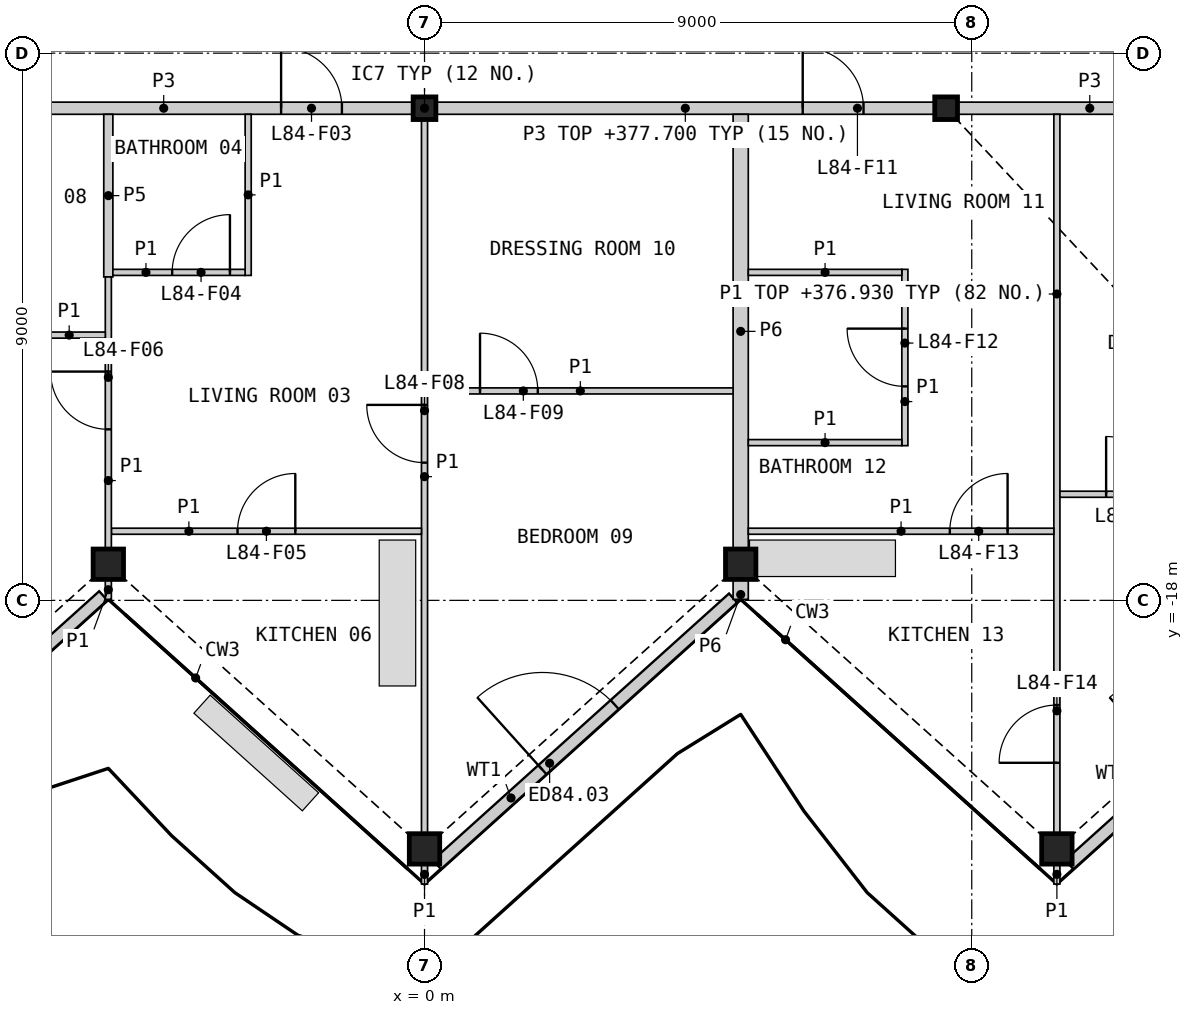
"""IFC4 building model, lengths in metres.
Left out: names, types, materials, properties, quantities, classifications, styles, units other than length and angle.
Written with IfcOpenShell. Run it as: python <this file> out.ifc"""

import sys

from ifc_helpers import new_model, si_unit, direction, frame, frame_2d, origin, origin_2d, place, context, subcontext, project, spatial, rectangle, hollow_rectangle, i_section, extrude, element, fill, save


model = new_model("IFC4")
c1 = context("Model", 3, precision=1e-05, world=origin(), true_north=direction((0.0, 1.0)))
c2 = subcontext(c1, "Body", "Model", "MODEL_VIEW")
j1 = project(units=[si_unit("LENGTHUNIT", "METRE"), si_unit("PLANEANGLEUNIT", "RADIAN")], contexts=[c1])
p1 = place(None, origin())
s1 = spatial("IfcSite", under=j1, at=p1, CompositionType="ELEMENT")
p2 = place(p1, origin())
s2 = spatial("IfcBuilding", under=s1, at=p2, CompositionType="ELEMENT")
p3 = place(p2, frame((0.0, 0.0, 374.6)))
s3 = spatial("IfcBuildingStorey", under=s2, at=p3, CompositionType="ELEMENT", Elevation=374.6)
for number, where, z_axis, x_axis in (
    (1, (-5.2, -17.406, 0.0), (0.0, 0.0, 1.0), (1.0, 0.0, 0.0)),
    (2, (0.0, -22.088, 0.0), (0.0, 0.0, 1.0), (1.0, 0.0, 0.0)),
    (3, (5.2, -17.406, 0.0), (0.0, 0.0, 1.0), (1.0, 0.0, 0.0)),
    (4, (10.4, -22.088, 0.0), (0.0, 0.0, 1.0), (1.0, 0.0, 0.0)),
):
    element("IfcColumn", number, at=place(p3, frame(where, z_axis=z_axis, x_axis=x_axis)), inside=s3, PredefinedType="COLUMN", context=c2, shape_type="SweptSolid", body=[
        extrude(hollow_rectangle(XDim=0.5, YDim=0.5, WallThickness=0.03, at=origin_2d()), origin(), (0.0, 0.0, 1.0), 3.4),
    ])
for number, where, z_axis, x_axis in (
    (5, (0.0, -9.906, 0.0), (0.0, 0.0, 1.0), (1.0, 0.0, 0.0)),
    (6, (8.578, -9.906, 0.0), (0.0, 0.0, 1.0), (1.0, 0.0, 0.0)),
):
    element("IfcColumn", number, at=place(p3, frame(where, z_axis=z_axis, x_axis=x_axis)), inside=s3, PredefinedType="COLUMN", context=c2, shape_type="SweptSolid", body=[
        extrude(i_section(OverallWidth=0.374, OverallDepth=0.372, WebThickness=0.016, FlangeThickness=0.026, at=origin_2d()), origin(), (0.0, 0.0, 1.0), 3.4),
    ])
p4 = place(p3, frame((-10.195, -22.346, 0.0), z_axis=(0.0, 0.0, 1.0), x_axis=(0.74313432117, 0.66914227239, 0.0)))
e7 = element("IfcWall", 7, at=p4, inside=s3, PredefinedType="SOLIDWALL", context=c2, shape_type="SweptSolid", body=[
    extrude(rectangle(XDim=6.609, YDim=0.2, at=frame_2d((3.304, 0.0))), origin(), (0.0, 0.0, 1.0), 2.634),
])
p5 = place(p4, frame((2.333, 0.0, 0.0)))
e8 = element("IfcOpeningElement", 8, at=p5, cuts=e7, PredefinedType="OPENING", context=c2, shape_type="SweptSolid", body=[
    extrude(rectangle(XDim=1.6, YDim=2.25, at=frame_2d((0.8, 1.125))), frame((0.0, 0.11, 0.0), z_axis=(0.0, -1.0, 0.0), x_axis=(1.0, 0.0, 0.0)), (0.0, 0.0, 1.0), 0.22),
])
p6 = place(p3, frame((0.205, -22.346, 0.0), z_axis=(0.0, 0.0, 1.0), x_axis=(0.74313295916, 0.669143785004, 0.0)))
e9 = element("IfcWall", 9, at=p6, inside=s3, PredefinedType="SOLIDWALL", context=c2, shape_type="SweptSolid", body=[
    extrude(rectangle(XDim=6.553, YDim=0.2, at=frame_2d((3.277, 0.0))), origin(), (0.0, 0.0, 1.0), 2.634),
])
p7 = place(p6, frame((2.333, 0.0, 0.0)))
e10 = element("IfcOpeningElement", 10, at=p7, cuts=e9, PredefinedType="OPENING", context=c2, shape_type="SweptSolid", body=[
    extrude(rectangle(XDim=1.6, YDim=2.25, at=frame_2d((0.8, 1.125))), frame((0.0, 0.11, 0.0), z_axis=(0.0, -1.0, 0.0), x_axis=(1.0, 0.0, 0.0)), (0.0, 0.0, 1.0), 0.22),
])
p8 = place(p3, frame((10.605, -22.346, 0.0), z_axis=(0.0, 0.0, 1.0), x_axis=(0.743137181878, 0.669139095339, 0.0)))
e11 = element("IfcWall", 11, at=p8, inside=s3, PredefinedType="SOLIDWALL", context=c2, shape_type="SweptSolid", body=[
    extrude(rectangle(XDim=6.265, YDim=0.2, at=frame_2d((3.133, 0.0))), origin(), (0.0, 0.0, 1.0), 2.634),
])
p9 = place(p8, frame((2.333, 0.0, 0.0)))
e12 = element("IfcOpeningElement", 12, at=p9, cuts=e11, PredefinedType="OPENING", context=c2, shape_type="SweptSolid", body=[
    extrude(rectangle(XDim=1.6, YDim=2.25, at=frame_2d((0.8, 1.125))), frame((0.0, 0.11, 0.0), z_axis=(0.0, -1.0, 0.0), x_axis=(1.0, 0.0, 0.0)), (0.0, 0.0, 1.0), 0.22),
])
p10 = place(p3, frame((0.197, -9.906, 0.0), z_axis=(0.0, 0.0, 1.0), x_axis=(1.0, 0.0, 0.0)))
e13 = element("IfcWall", 13, at=p10, inside=s3, PredefinedType="PARTITIONING", context=c2, shape_type="SweptSolid", body=[
    extrude(rectangle(XDim=8.185, YDim=0.2, at=frame_2d((4.092, 0.0))), origin(), (0.0, 0.0, 1.0), 3.1),
])
p11 = place(p10, frame((6.023, 0.0, 0.0)))
e14 = element("IfcOpeningElement", 14, at=p11, cuts=e13, PredefinedType="OPENING", context=c2, shape_type="SweptSolid", body=[
    extrude(rectangle(XDim=1.0, YDim=2.1, at=frame_2d((0.5, 1.05))), frame((0.0, 0.11, 0.0), z_axis=(0.0, -1.0, 0.0), x_axis=(1.0, 0.0, 0.0)), (0.0, 0.0, 1.0), 0.22),
])
p12 = place(p3, frame((-8.382, -9.906, 0.0), z_axis=(0.0, 0.0, 1.0), x_axis=(1.0, 0.0, 0.0)))
e15 = element("IfcWall", 15, at=p12, inside=s3, PredefinedType="PARTITIONING", context=c2, shape_type="SweptSolid", body=[
    extrude(rectangle(XDim=8.185, YDim=0.2, at=frame_2d((4.092, 0.0))), origin(), (0.0, 0.0, 1.0), 3.1),
])
p13 = place(p12, frame((6.023, 0.0, 0.0)))
e16 = element("IfcOpeningElement", 16, at=p13, cuts=e15, PredefinedType="OPENING", context=c2, shape_type="SweptSolid", body=[
    extrude(rectangle(XDim=1.0, YDim=2.1, at=frame_2d((0.5, 1.05))), frame((0.0, 0.11, 0.0), z_axis=(0.0, -1.0, 0.0), x_axis=(1.0, 0.0, 0.0)), (0.0, 0.0, 1.0), 0.22),
])
p14 = place(p3, frame((5.2, -17.146, 0.0), z_axis=(0.0, 0.0, 1.0), x_axis=(0.0, 1.0, 0.0)))
e17 = element("IfcWall", 17, at=p14, inside=s3, PredefinedType="PARTITIONING", context=c2, shape_type="SweptSolid", body=[
    extrude(rectangle(XDim=7.14, YDim=0.25, at=frame_2d((3.57, 0.0))), origin(), (0.0, 0.0, 1.0), 2.33),
])
p15 = place(p3, frame((8.775, -9.906, 0.0), z_axis=(0.0, 0.0, 1.0), x_axis=(1.0, 0.0, 0.0)))
e18 = element("IfcWall", 18, at=p15, inside=s3, PredefinedType="PARTITIONING", context=c2, shape_type="SweptSolid", body=[
    extrude(rectangle(XDim=4.331, YDim=0.2, at=frame_2d((2.165, 0.0))), origin(), (0.0, 0.0, 1.0), 3.1),
])
p16 = place(p3, frame((5.2, -17.983, 0.0), z_axis=(0.0, 0.0, 1.0), x_axis=(0.0, 1.0, 0.0)))
e19 = element("IfcWall", 19, at=p16, inside=s3, PredefinedType="PARTITIONING", context=c2, shape_type="SweptSolid", body=[
    extrude(rectangle(XDim=0.318, YDim=0.25, at=frame_2d((0.159, 0.0))), origin(), (0.0, 0.0, 1.0), 2.33),
])
p17 = place(p3, frame((-5.2, -12.681, 0.0), z_axis=(0.0, 0.0, 1.0), x_axis=(0.0, 1.0, 0.0)))
e20 = element("IfcWall", 20, at=p17, inside=s3, PredefinedType="PLUMBINGWALL", context=c2, shape_type="SweptSolid", body=[
    extrude(rectangle(XDim=2.675, YDim=0.15, at=frame_2d((1.337, 0.0))), origin(), (0.0, 0.0, 1.0), 2.33),
])
p18 = place(p3, frame((10.4, -21.828, 0.0), z_axis=(0.0, 0.0, 1.0), x_axis=(0.0, 1.0, 0.0)))
e21 = element("IfcWall", 21, at=p18, inside=s3, PredefinedType="PARTITIONING", context=c2, shape_type="SweptSolid", body=[
    extrude(rectangle(XDim=11.822, YDim=0.1, at=frame_2d((5.911, 0.0))), origin(), (0.0, 0.0, 1.0), 2.33),
])
p19 = place(p18, frame((1.156, 0.0, 0.0)))
e22 = element("IfcOpeningElement", 22, at=p19, cuts=e21, PredefinedType="OPENING", context=c2, shape_type="SweptSolid", body=[
    extrude(rectangle(XDim=0.95, YDim=2.1, at=frame_2d((0.475, 1.05))), frame((0.0, 0.06, 0.0), z_axis=(0.0, -1.0, 0.0), x_axis=(1.0, 0.0, 0.0)), (0.0, 0.0, 1.0), 0.12),
])
p20 = place(p3, frame((0.0, -21.828, 0.0), z_axis=(0.0, 0.0, 1.0), x_axis=(0.0, 1.0, 0.0)))
e23 = element("IfcWall", 23, at=p20, inside=s3, PredefinedType="PARTITIONING", context=c2, shape_type="SweptSolid", body=[
    extrude(rectangle(XDim=11.725, YDim=0.1, at=frame_2d((5.863, 0.0))), origin(), (0.0, 0.0, 1.0), 2.33),
])
p21 = place(p20, frame((6.093, 0.0, 0.0)))
e24 = element("IfcOpeningElement", 24, at=p21, cuts=e23, PredefinedType="OPENING", context=c2, shape_type="SweptSolid", body=[
    extrude(rectangle(XDim=0.95, YDim=2.1, at=frame_2d((0.475, 1.05))), frame((0.0, 0.06, 0.0), z_axis=(0.0, -1.0, 0.0), x_axis=(1.0, 0.0, 0.0)), (0.0, 0.0, 1.0), 0.12),
])
p22 = place(p3, frame((10.45, -16.255, 0.0), z_axis=(0.0, 0.0, 1.0), x_axis=(1.0, 0.0, 0.0)))
e25 = element("IfcWall", 25, at=p22, inside=s3, PredefinedType="PARTITIONING", context=c2, shape_type="SweptSolid", body=[
    extrude(rectangle(XDim=6.447, YDim=0.1, at=frame_2d((3.223, 0.0))), origin(), (0.0, 0.0, 1.0), 2.33),
])
p23 = place(p22, frame((0.76, 0.0, 0.0)))
e26 = element("IfcOpeningElement", 26, at=p23, cuts=e25, PredefinedType="OPENING", context=c2, shape_type="SweptSolid", body=[
    extrude(rectangle(XDim=0.95, YDim=2.1, at=frame_2d((0.475, 1.05))), frame((0.0, 0.06, 0.0), z_axis=(0.0, -1.0, 0.0), x_axis=(1.0, 0.0, 0.0)), (0.0, 0.0, 1.0), 0.12),
])
p24 = place(p3, frame((-5.15, -16.863, 0.0), z_axis=(0.0, 0.0, 1.0), x_axis=(1.0, 0.0, 0.0)))
e27 = element("IfcWall", 27, at=p24, inside=s3, PredefinedType="PARTITIONING", context=c2, shape_type="SweptSolid", body=[
    extrude(rectangle(XDim=5.1, YDim=0.1, at=frame_2d((2.55, 0.0))), origin(), (0.0, 0.0, 1.0), 2.33),
])
p25 = place(p24, frame((2.075, 0.0, 0.0)))
e28 = element("IfcOpeningElement", 28, at=p25, cuts=e27, PredefinedType="OPENING", context=c2, shape_type="SweptSolid", body=[
    extrude(rectangle(XDim=0.95, YDim=2.1, at=frame_2d((0.475, 1.05))), frame((0.0, 0.06, 0.0), z_axis=(0.0, -1.0, 0.0), x_axis=(1.0, 0.0, 0.0)), (0.0, 0.0, 1.0), 0.12),
])
p26 = place(p3, frame((5.325, -16.863, 0.0), z_axis=(0.0, 0.0, 1.0), x_axis=(1.0, 0.0, 0.0)))
e29 = element("IfcWall", 29, at=p26, inside=s3, PredefinedType="PARTITIONING", context=c2, shape_type="SweptSolid", body=[
    extrude(rectangle(XDim=5.025, YDim=0.1, at=frame_2d((2.513, 0.0))), origin(), (0.0, 0.0, 1.0), 2.33),
])
p27 = place(p26, frame((3.314, 0.0, 0.0)))
e30 = element("IfcOpeningElement", 30, at=p27, cuts=e29, PredefinedType="OPENING", context=c2, shape_type="SweptSolid", body=[
    extrude(rectangle(XDim=0.95, YDim=2.1, at=frame_2d((0.475, 1.05))), frame((0.0, 0.06, 0.0), z_axis=(0.0, -1.0, 0.0), x_axis=(1.0, 0.0, 0.0)), (0.0, 0.0, 1.0), 0.12),
])
p28 = place(p3, frame((0.05, -14.555, 0.0), z_axis=(0.0, 0.0, 1.0), x_axis=(1.0, 0.0, 0.0)))
e31 = element("IfcWall", 31, at=p28, inside=s3, PredefinedType="PARTITIONING", context=c2, shape_type="SweptSolid", body=[
    extrude(rectangle(XDim=5.025, YDim=0.1, at=frame_2d((2.512, 0.0))), origin(), (0.0, 0.0, 1.0), 2.33),
])
p29 = place(p28, frame((0.863, 0.0, 0.0)))
e32 = element("IfcOpeningElement", 32, at=p29, cuts=e31, PredefinedType="OPENING", context=c2, shape_type="SweptSolid", body=[
    extrude(rectangle(XDim=0.95, YDim=2.1, at=frame_2d((0.475, 1.05))), frame((0.0, 0.06, 0.0), z_axis=(0.0, -1.0, 0.0), x_axis=(1.0, 0.0, 0.0)), (0.0, 0.0, 1.0), 0.12),
])
p30 = place(p3, frame((-5.2, -17.146, 0.0), z_axis=(0.0, 0.0, 1.0), x_axis=(0.0, 1.0, 0.0)))
e33 = element("IfcWall", 33, at=p30, inside=s3, PredefinedType="PARTITIONING", context=c2, shape_type="SweptSolid", body=[
    extrude(rectangle(XDim=4.465, YDim=0.1, at=frame_2d((2.232, 0.0))), origin(), (0.0, 0.0, 1.0), 2.33),
])
p31 = place(p30, frame((1.958, 0.0, 0.0)))
e34 = element("IfcOpeningElement", 34, at=p31, cuts=e33, PredefinedType="OPENING", context=c2, shape_type="SweptSolid", body=[
    extrude(rectangle(XDim=0.95, YDim=2.1, at=frame_2d((0.475, 1.05))), frame((0.0, 0.06, 0.0), z_axis=(0.0, -1.0, 0.0), x_axis=(1.0, 0.0, 0.0)), (0.0, 0.0, 1.0), 0.12),
])
p32 = place(p3, frame((7.9, -15.456, 0.0), z_axis=(0.0, 0.0, 1.0), x_axis=(0.0, 1.0, 0.0)))
e35 = element("IfcWall", 35, at=p32, inside=s3, PredefinedType="PARTITIONING", context=c2, shape_type="SweptSolid", body=[
    extrude(rectangle(XDim=2.9, YDim=0.1, at=frame_2d((1.45, 0.0))), origin(), (0.0, 0.0, 1.0), 2.33),
])
p33 = place(p32, frame((0.975, 0.0, 0.0)))
e36 = element("IfcOpeningElement", 36, at=p33, cuts=e35, PredefinedType="OPENING", context=c2, shape_type="SweptSolid", body=[
    extrude(rectangle(XDim=0.95, YDim=2.1, at=frame_2d((0.475, 1.05))), frame((0.0, 0.06, 0.0), z_axis=(0.0, -1.0, 0.0), x_axis=(1.0, 0.0, 0.0)), (0.0, 0.0, 1.0), 0.12),
])
p34 = place(p3, frame((-2.9, -12.656, 0.0), z_axis=(0.0, 0.0, 1.0), x_axis=(0.0, 1.0, 0.0)))
e37 = element("IfcWall", 37, at=p34, inside=s3, PredefinedType="PARTITIONING", context=c2, shape_type="SweptSolid", body=[
    extrude(rectangle(XDim=2.65, YDim=0.1, at=frame_2d((1.325, 0.0))), origin(), (0.0, 0.0, 1.0), 2.33),
])
for number, where, z_axis, x_axis in (
    (38, (5.325, -12.606, 0.0), (0.0, 0.0, 1.0), (1.0, 0.0, 0.0)),
    (39, (5.325, -15.406, 0.0), (0.0, 0.0, 1.0), (1.0, 0.0, 0.0)),
):
    element("IfcWall", number, at=place(p3, frame(where, z_axis=z_axis, x_axis=x_axis)), inside=s3, PredefinedType="PARTITIONING", context=c2, shape_type="SweptSolid", body=[
        extrude(rectangle(XDim=2.525, YDim=0.1, at=frame_2d((1.263, 0.0))), origin(), (0.0, 0.0, 1.0), 2.33),
    ])
p35 = place(p3, frame((-7.625, -13.637, 0.0), z_axis=(0.0, 0.0, 1.0), x_axis=(1.0, 0.0, 0.0)))
e40 = element("IfcWall", 40, at=p35, inside=s3, PredefinedType="PARTITIONING", context=c2, shape_type="SweptSolid", body=[
    extrude(rectangle(XDim=2.375, YDim=0.1, at=frame_2d((1.188, 0.0))), origin(), (0.0, 0.0, 1.0), 2.33),
])
p36 = place(p35, frame((0.25, 0.0, 0.0)))
e41 = element("IfcOpeningElement", 41, at=p36, cuts=e40, PredefinedType="OPENING", context=c2, shape_type="SweptSolid", body=[
    extrude(rectangle(XDim=0.95, YDim=2.1, at=frame_2d((0.475, 1.05))), frame((0.0, 0.06, 0.0), z_axis=(0.0, -1.0, 0.0), x_axis=(1.0, 0.0, 0.0)), (0.0, 0.0, 1.0), 0.12),
])
p37 = place(p3, frame((-5.125, -12.606, 0.0), z_axis=(0.0, 0.0, 1.0), x_axis=(1.0, 0.0, 0.0)))
e42 = element("IfcWall", 42, at=p37, inside=s3, PredefinedType="PARTITIONING", context=c2, shape_type="SweptSolid", body=[
    extrude(rectangle(XDim=2.175, YDim=0.1, at=frame_2d((1.087, 0.0))), origin(), (0.0, 0.0, 1.0), 2.33),
])
p38 = place(p37, frame((0.975, 0.0, 0.0)))
e43 = element("IfcOpeningElement", 43, at=p38, cuts=e42, PredefinedType="OPENING", context=c2, shape_type="SweptSolid", body=[
    extrude(rectangle(XDim=0.95, YDim=2.1, at=frame_2d((0.475, 1.05))), frame((0.0, 0.06, 0.0), z_axis=(0.0, -1.0, 0.0), x_axis=(1.0, 0.0, 0.0)), (0.0, 0.0, 1.0), 0.12),
])
for number, where, z_axis, x_axis in (
    (44, (-5.2, -17.983, 0.0), (0.0, 0.0, 1.0), (0.0, 1.0, 0.0)),
    (45, (0.0, -22.666, 0.0), (0.0, 0.0, 1.0), (0.0, 1.0, 0.0)),
    (46, (10.4, -22.666, 0.0), (0.0, 0.0, 1.0), (0.0, 1.0, 0.0)),
):
    element("IfcWall", number, at=place(p3, frame(where, z_axis=z_axis, x_axis=x_axis)), inside=s3, PredefinedType="PARTITIONING", context=c2, shape_type="SweptSolid", body=[
        extrude(rectangle(XDim=0.318, YDim=0.1, at=frame_2d((0.159, 0.0))), origin(), (0.0, 0.0, 1.0), 2.33),
    ])
p39 = place(p7, origin())
e47 = element("IfcDoor", 47, at=p39, inside=s3, OperationType="DOUBLE_DOOR_SINGLE_SWING", PredefinedType="DOOR", context=c2, shape_type="SweptSolid", body=[
    extrude(rectangle(XDim=1.6, YDim=2.25, at=frame_2d((0.8, 1.125))), frame((0.0, 0.025, 0.0), z_axis=(0.0, -1.0, 0.0), x_axis=(1.0, 0.0, 0.0)), (0.0, 0.0, 1.0), 0.05),
])
fill(e10, e47)
p40 = place(p13, origin())
e48 = element("IfcDoor", 48, at=p40, inside=s3, OperationType="SINGLE_SWING_LEFT", PredefinedType="DOOR", context=c2, shape_type="SweptSolid", body=[
    extrude(rectangle(XDim=1.0, YDim=2.1, at=frame_2d((0.5, 1.05))), frame((0.0, 0.025, 0.0), z_axis=(0.0, -1.0, 0.0), x_axis=(1.0, 0.0, 0.0)), (0.0, 0.0, 1.0), 0.05),
])
fill(e16, e48)
p41 = place(p38, origin())
e49 = element("IfcDoor", 49, at=p41, inside=s3, OperationType="SINGLE_SWING_RIGHT", PredefinedType="DOOR", context=c2, shape_type="SweptSolid", body=[
    extrude(rectangle(XDim=0.95, YDim=2.1, at=frame_2d((0.475, 1.05))), frame((0.0, 0.025, 0.0), z_axis=(0.0, -1.0, 0.0), x_axis=(1.0, 0.0, 0.0)), (0.0, 0.0, 1.0), 0.05),
])
fill(e43, e49)
p42 = place(p25, origin())
e50 = element("IfcDoor", 50, at=p42, inside=s3, OperationType="SINGLE_SWING_RIGHT", PredefinedType="DOOR", context=c2, shape_type="SweptSolid", body=[
    extrude(rectangle(XDim=0.95, YDim=2.1, at=frame_2d((0.475, 1.05))), frame((0.0, 0.025, 0.0), z_axis=(0.0, -1.0, 0.0), x_axis=(1.0, 0.0, 0.0)), (0.0, 0.0, 1.0), 0.05),
])
fill(e28, e50)
p43 = place(p31, origin())
e51 = element("IfcDoor", 51, at=p43, inside=s3, OperationType="SINGLE_SWING_RIGHT", PredefinedType="DOOR", context=c2, shape_type="SweptSolid", body=[
    extrude(rectangle(XDim=0.95, YDim=2.1, at=frame_2d((0.475, 1.05))), frame((0.0, 0.025, 0.0), z_axis=(0.0, -1.0, 0.0), x_axis=(1.0, 0.0, 0.0)), (0.0, 0.0, 1.0), 0.05),
])
fill(e34, e51)
p44 = place(p21, origin())
e52 = element("IfcDoor", 52, at=p44, inside=s3, OperationType="SINGLE_SWING_RIGHT", PredefinedType="DOOR", context=c2, shape_type="SweptSolid", body=[
    extrude(rectangle(XDim=0.95, YDim=2.1, at=frame_2d((0.475, 1.05))), frame((0.0, 0.025, 0.0), z_axis=(0.0, -1.0, 0.0), x_axis=(1.0, 0.0, 0.0)), (0.0, 0.0, 1.0), 0.05),
])
fill(e24, e52)
p45 = place(p29, origin())
e53 = element("IfcDoor", 53, at=p45, inside=s3, OperationType="SINGLE_SWING_LEFT", PredefinedType="DOOR", context=c2, shape_type="SweptSolid", body=[
    extrude(rectangle(XDim=0.95, YDim=2.1, at=frame_2d((0.475, 1.05))), frame((0.0, 0.025, 0.0), z_axis=(0.0, -1.0, 0.0), x_axis=(1.0, 0.0, 0.0)), (0.0, 0.0, 1.0), 0.05),
])
fill(e32, e53)
p46 = place(p11, origin())
e54 = element("IfcDoor", 54, at=p46, inside=s3, OperationType="SINGLE_SWING_LEFT", PredefinedType="DOOR", context=c2, shape_type="SweptSolid", body=[
    extrude(rectangle(XDim=1.0, YDim=2.1, at=frame_2d((0.5, 1.05))), frame((0.0, 0.025, 0.0), z_axis=(0.0, -1.0, 0.0), x_axis=(1.0, 0.0, 0.0)), (0.0, 0.0, 1.0), 0.05),
])
fill(e14, e54)
p47 = place(p33, origin())
e55 = element("IfcDoor", 55, at=p47, inside=s3, OperationType="SINGLE_SWING_RIGHT", PredefinedType="DOOR", context=c2, shape_type="SweptSolid", body=[
    extrude(rectangle(XDim=0.95, YDim=2.1, at=frame_2d((0.475, 1.05))), frame((0.0, 0.025, 0.0), z_axis=(0.0, -1.0, 0.0), x_axis=(1.0, 0.0, 0.0)), (0.0, 0.0, 1.0), 0.05),
])
fill(e36, e55)
p48 = place(p27, origin())
e56 = element("IfcDoor", 56, at=p48, inside=s3, OperationType="SINGLE_SWING_RIGHT", PredefinedType="DOOR", context=c2, shape_type="SweptSolid", body=[
    extrude(rectangle(XDim=0.95, YDim=2.1, at=frame_2d((0.475, 1.05))), frame((0.0, 0.025, 0.0), z_axis=(0.0, -1.0, 0.0), x_axis=(1.0, 0.0, 0.0)), (0.0, 0.0, 1.0), 0.05),
])
fill(e30, e56)
p49 = place(p19, origin())
e57 = element("IfcDoor", 57, at=p49, inside=s3, OperationType="SINGLE_SWING_LEFT", PredefinedType="DOOR", context=c2, shape_type="SweptSolid", body=[
    extrude(rectangle(XDim=0.95, YDim=2.1, at=frame_2d((0.475, 1.05))), frame((0.0, 0.025, 0.0), z_axis=(0.0, -1.0, 0.0), x_axis=(1.0, 0.0, 0.0)), (0.0, 0.0, 1.0), 0.05),
])
fill(e22, e57)
p50 = place(p23, origin())
e58 = element("IfcDoor", 58, at=p50, inside=s3, OperationType="SINGLE_SWING_LEFT", PredefinedType="DOOR", context=c2, shape_type="SweptSolid", body=[
    extrude(rectangle(XDim=0.95, YDim=2.1, at=frame_2d((0.475, 1.05))), frame((0.0, 0.025, 0.0), z_axis=(0.0, -1.0, 0.0), x_axis=(1.0, 0.0, 0.0)), (0.0, 0.0, 1.0), 0.05),
])
fill(e26, e58)
save(model, sys.argv[1])
